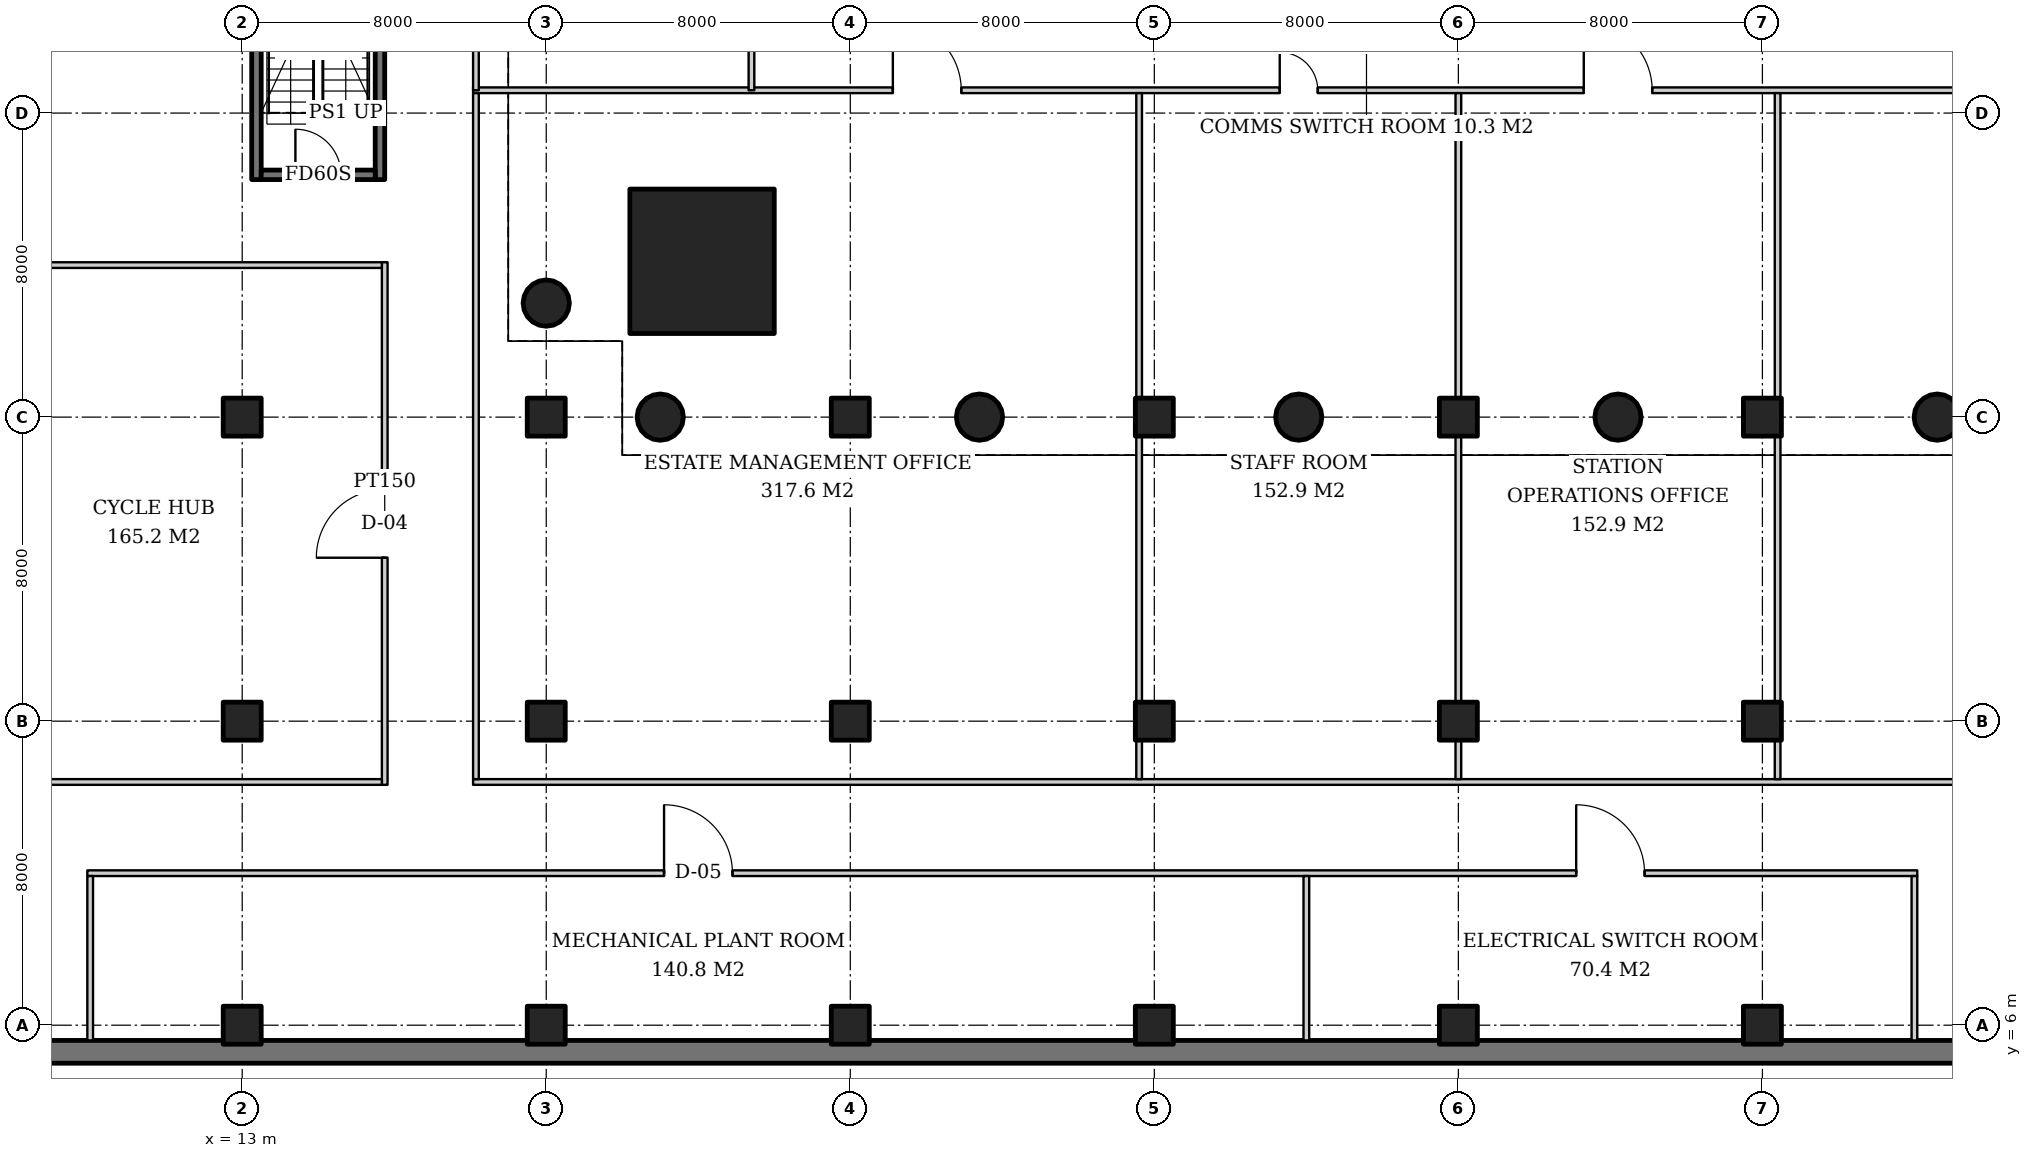
"""IFC4 building model, lengths in metres.
Left out: names, types, materials, properties, quantities, classifications, styles, units other than length and angle.
Written with IfcOpenShell. Run it as: python <this file> out.ifc"""

import sys

from ifc_helpers import new_model, si_unit, direction, frame, frame_2d, origin, origin_2d, place, context, subcontext, project, spatial, rectangle, hollow_circle, extrude, element, fill, save


model = new_model("IFC4")
c1 = context("Model", 3, precision=1e-05, world=origin(), true_north=direction((0.0, 1.0)))
c2 = subcontext(c1, "Body", "Model", "MODEL_VIEW")
j1 = project(units=[si_unit("LENGTHUNIT", "METRE"), si_unit("PLANEANGLEUNIT", "RADIAN")], contexts=[c1])
p1 = place(None, origin())
s1 = spatial("IfcSite", under=j1, at=p1, CompositionType="ELEMENT")
p2 = place(p1, origin())
s2 = spatial("IfcBuilding", under=s1, at=p2, CompositionType="ELEMENT")
p3 = place(p2, frame((0.0, 0.0, -5.0)))
s3 = spatial("IfcBuildingStorey", under=s2, at=p3, CompositionType="ELEMENT", Elevation=-5.0)
for number, where, z_axis, x_axis in (
    (1, (13.0, 6.0, 0.0), (0.0, 0.0, 1.0), (1.0, 0.0, 0.0)),
    (2, (13.0, 14.0, 0.0), (0.0, 0.0, 1.0), (1.0, 0.0, 0.0)),
    (3, (13.0, 22.0, 0.0), (0.0, 0.0, 1.0), (1.0, 0.0, 0.0)),
    (4, (21.0, 6.0, 0.0), (0.0, 0.0, 1.0), (1.0, 0.0, 0.0)),
    (5, (21.0, 14.0, 0.0), (0.0, 0.0, 1.0), (1.0, 0.0, 0.0)),
    (6, (29.0, 6.0, 0.0), (0.0, 0.0, 1.0), (1.0, 0.0, 0.0)),
    (7, (29.0, 14.0, 0.0), (0.0, 0.0, 1.0), (1.0, 0.0, 0.0)),
    (8, (37.0, 6.0, 0.0), (0.0, 0.0, 1.0), (1.0, 0.0, 0.0)),
    (9, (37.0, 14.0, 0.0), (0.0, 0.0, 1.0), (1.0, 0.0, 0.0)),
    (10, (45.0, 6.0, 0.0), (0.0, 0.0, 1.0), (1.0, 0.0, 0.0)),
    (11, (45.0, 14.0, 0.0), (0.0, 0.0, 1.0), (1.0, 0.0, 0.0)),
    (12, (53.0, 6.0, 0.0), (0.0, 0.0, 1.0), (1.0, 0.0, 0.0)),
    (13, (53.0, 14.0, 0.0), (0.0, 0.0, 1.0), (1.0, 0.0, 0.0)),
):
    element("IfcColumn", number, at=place(p3, frame(where, z_axis=z_axis, x_axis=x_axis)), inside=s3, PredefinedType="COLUMN", context=c2, shape_type="SweptSolid", body=[
        extrude(rectangle(XDim=1.0, YDim=1.0, at=origin_2d()), origin(), (0.0, 0.0, 1.0), 5.0),
    ])
p4 = place(p3, frame((4.0, 5.3, 0.0), z_axis=(0.0, 0.0, 1.0), x_axis=(1.0, 0.0, 0.0)))
e14 = element("IfcWall", 14, at=p4, inside=s3, PredefinedType="USERDEFINED", context=c2, shape_type="SweptSolid", body=[
    extrude(rectangle(XDim=80.975, YDim=0.6, at=frame_2d((40.488, 0.0))), origin(), (0.0, 0.0, 1.0), 5.0),
])
p5 = place(p3, frame((25.1, 26.1, 0.0), z_axis=(0.0, 0.0, 1.0), x_axis=(1.0, 0.0, 0.0)))
e15 = element("IfcColumn", 15, at=p5, inside=s3, PredefinedType="COLUMN", context=c2, shape_type="SweptSolid", body=[
    extrude(rectangle(XDim=3.8, YDim=3.8, at=origin_2d()), origin(), (0.0, 0.0, 1.0), 5.0),
])
for number, where, z_axis, x_axis in (
    (16, (21.0, 25.0, 0.0), (0.0, 0.0, 1.0), (1.0, 0.0, 0.0)),
    (17, (24.0, 22.0, 0.0), (0.0, 0.0, 1.0), (1.0, 0.0, 0.0)),
    (18, (32.4, 22.0, 0.0), (0.0, 0.0, 1.0), (1.0, 0.0, 0.0)),
    (19, (40.8, 22.0, 0.0), (0.0, 0.0, 1.0), (1.0, 0.0, 0.0)),
    (20, (49.2, 22.0, 0.0), (0.0, 0.0, 1.0), (1.0, 0.0, 0.0)),
    (21, (57.6, 22.0, 0.0), (0.0, 0.0, 1.0), (1.0, 0.0, 0.0)),
):
    element("IfcColumn", number, at=place(p3, frame(where, z_axis=z_axis, x_axis=x_axis)), inside=s3, PredefinedType="COLUMN", context=c2, shape_type="SweptSolid", body=[
        extrude(hollow_circle(Radius=0.61, WallThickness=0.04, at=origin_2d()), origin(), (0.0, 0.0, 1.0), 5.0),
    ])
for number, where, z_axis, x_axis in (
    (22, (21.0, 22.0, 0.0), (0.0, 0.0, 1.0), (1.0, 0.0, 0.0)),
    (23, (29.0, 22.0, 0.0), (0.0, 0.0, 1.0), (1.0, 0.0, 0.0)),
    (24, (37.0, 22.0, 0.0), (0.0, 0.0, 1.0), (1.0, 0.0, 0.0)),
    (25, (45.0, 22.0, 0.0), (0.0, 0.0, 1.0), (1.0, 0.0, 0.0)),
    (26, (53.0, 22.0, 0.0), (0.0, 0.0, 1.0), (1.0, 0.0, 0.0)),
):
    element("IfcColumn", number, at=place(p3, frame(where, z_axis=z_axis, x_axis=x_axis)), inside=s3, PredefinedType="COLUMN", context=c2, shape_type="SweptSolid", body=[
        extrude(rectangle(XDim=1.0, YDim=1.0, at=origin_2d()), origin(), (0.0, 0.0, 1.0), 5.0),
    ])
for number, where, z_axis, x_axis in (
    (27, (13.375, 28.25, 0.0), (0.0, 0.0, 1.0), (0.0, 1.0, 0.0)),
    (28, (16.625, 28.25, 0.0), (0.0, 0.0, 1.0), (0.0, 1.0, 0.0)),
):
    element("IfcWall", number, at=place(p3, frame(where, z_axis=z_axis, x_axis=x_axis)), inside=s3, PredefinedType="SOLIDWALL", context=c2, shape_type="SweptSolid", body=[
        extrude(rectangle(XDim=8.5, YDim=0.25, at=frame_2d((4.25, 0.0))), origin(), (0.0, 0.0, 1.0), 4.6),
    ])
p6 = place(p3, frame((13.5, 28.375, 0.0), z_axis=(0.0, 0.0, 1.0), x_axis=(1.0, 0.0, 0.0)))
e29 = element("IfcWall", 29, at=p6, inside=s3, PredefinedType="SOLIDWALL", context=c2, shape_type="SweptSolid", body=[
    extrude(rectangle(XDim=3.0, YDim=0.25, at=frame_2d((1.5, 0.0))), origin(), (0.0, 0.0, 1.0), 4.6),
])
p7 = place(p6, frame((0.9, 0.0, 0.0)))
e30 = element("IfcOpeningElement", 30, at=p7, cuts=e29, PredefinedType="OPENING", context=c2, shape_type="SweptSolid", body=[
    extrude(rectangle(XDim=1.2, YDim=2.1, at=frame_2d((0.6, 1.05))), frame((0.0, 0.135, 0.0), z_axis=(0.0, -1.0, 0.0), x_axis=(1.0, 0.0, 0.0)), (0.0, 0.0, 1.0), 0.27),
])
p8 = place(p3, frame((8.925, 10.0, 0.0), z_axis=(0.0, 0.0, 1.0), x_axis=(1.0, 0.0, 0.0)))
e31 = element("IfcWall", 31, at=p8, inside=s3, PredefinedType="PARTITIONING", context=c2, shape_type="SweptSolid", body=[
    extrude(rectangle(XDim=48.15, YDim=0.15, at=frame_2d((24.075, 0.0))), origin(), (0.0, 0.0, 1.0), 4.6),
])
p9 = place(p8, frame((15.175, 0.0, 0.0)))
e32 = element("IfcOpeningElement", 32, at=p9, cuts=e31, PredefinedType="OPENING", context=c2, shape_type="SweptSolid", body=[
    extrude(rectangle(XDim=1.8, YDim=2.4, at=frame_2d((0.9, 1.2))), frame((0.0, 0.085, 0.0), z_axis=(0.0, -1.0, 0.0), x_axis=(1.0, 0.0, 0.0)), (0.0, 0.0, 1.0), 0.17),
])
p10 = place(p8, frame((39.175, 0.0, 0.0)))
e33 = element("IfcOpeningElement", 33, at=p10, cuts=e31, PredefinedType="OPENING", context=c2, shape_type="SweptSolid", body=[
    extrude(rectangle(XDim=1.8, YDim=2.4, at=frame_2d((0.9, 1.2))), frame((0.0, 0.085, 0.0), z_axis=(0.0, -1.0, 0.0), x_axis=(1.0, 0.0, 0.0)), (0.0, 0.0, 1.0), 0.17),
])
for number, where, z_axis, x_axis in (
    (34, (9.0, 9.925, 0.0), (0.0, 0.0, 1.0), (0.0, -1.0, 0.0)),
    (35, (41.0, 9.925, 0.0), (0.0, 0.0, 1.0), (0.0, -1.0, 0.0)),
    (36, (57.0, 9.925, 0.0), (0.0, 0.0, 1.0), (0.0, -1.0, 0.0)),
):
    element("IfcWall", number, at=place(p3, frame(where, z_axis=z_axis, x_axis=x_axis)), inside=s3, PredefinedType="PARTITIONING", context=c2, shape_type="SweptSolid", body=[
        extrude(rectangle(XDim=4.325, YDim=0.15, at=frame_2d((2.163, 0.0))), origin(), (0.0, 0.0, 1.0), 4.6),
    ])
p11 = place(p3, frame((16.75, 12.325, 0.0), z_axis=(0.0, 0.0, 1.0), x_axis=(0.0, 1.0, 0.0)))
e37 = element("IfcWall", 37, at=p11, inside=s3, PredefinedType="PARTITIONING", context=c2, shape_type="SweptSolid", body=[
    extrude(rectangle(XDim=13.75, YDim=0.15, at=frame_2d((6.875, 0.0))), origin(), (0.0, 0.0, 1.0), 4.6),
])
p12 = place(p11, frame((5.975, 0.0, 0.0)))
e38 = element("IfcOpeningElement", 38, at=p12, cuts=e37, PredefinedType="OPENING", context=c2, shape_type="SweptSolid", body=[
    extrude(rectangle(XDim=1.8, YDim=2.4, at=frame_2d((0.9, 1.2))), frame((0.0, 0.085, 0.0), z_axis=(0.0, -1.0, 0.0), x_axis=(1.0, 0.0, 0.0)), (0.0, 0.0, 1.0), 0.17),
])
for number, where, z_axis, x_axis in (
    (39, (4.6, 12.4, 0.0), (0.0, 0.0, 1.0), (1.0, 0.0, 0.0)),
    (40, (4.6, 26.0, 0.0), (0.0, 0.0, 1.0), (1.0, 0.0, 0.0)),
):
    element("IfcWall", number, at=place(p3, frame(where, z_axis=z_axis, x_axis=x_axis)), inside=s3, PredefinedType="PARTITIONING", context=c2, shape_type="SweptSolid", body=[
        extrude(rectangle(XDim=12.075, YDim=0.15, at=frame_2d((6.038, 0.0))), origin(), (0.0, 0.0, 1.0), 4.6),
    ])
p13 = place(p3, frame((19.075, 12.4, 0.0), z_axis=(0.0, 0.0, 1.0), x_axis=(1.0, 0.0, 0.0)))
e41 = element("IfcWall", 41, at=p13, inside=s3, PredefinedType="PARTITIONING", context=c2, shape_type="SweptSolid", body=[
    extrude(rectangle(XDim=52.5, YDim=0.15, at=frame_2d((26.25, 0.0))), origin(), (0.0, 0.0, 1.0), 4.6),
])
p14 = place(p3, frame((19.075, 30.6, 0.0), z_axis=(0.0, 0.0, 1.0), x_axis=(1.0, 0.0, 0.0)))
e42 = element("IfcWall", 42, at=p14, inside=s3, PredefinedType="PARTITIONING", context=c2, shape_type="SweptSolid", body=[
    extrude(rectangle(XDim=52.5, YDim=0.15, at=frame_2d((26.25, 0.0))), origin(), (0.0, 0.0, 1.0), 3.688),
])
p15 = place(p14, frame((11.045, 0.0, 0.0)))
e43 = element("IfcOpeningElement", 43, at=p15, cuts=e42, PredefinedType="OPENING", context=c2, shape_type="SweptSolid", body=[
    extrude(rectangle(XDim=1.8, YDim=2.4, at=frame_2d((0.9, 1.2))), frame((0.0, 0.085, 0.0), z_axis=(0.0, -1.0, 0.0), x_axis=(1.0, 0.0, 0.0)), (0.0, 0.0, 1.0), 0.17),
])
p16 = place(p14, frame((21.225, 0.0, 0.0)))
e44 = element("IfcOpeningElement", 44, at=p16, cuts=e42, PredefinedType="OPENING", context=c2, shape_type="SweptSolid", body=[
    extrude(rectangle(XDim=1.0, YDim=2.1, at=frame_2d((0.5, 1.05))), frame((0.0, 0.085, 0.0), z_axis=(0.0, -1.0, 0.0), x_axis=(1.0, 0.0, 0.0)), (0.0, 0.0, 1.0), 0.17),
])
p17 = place(p14, frame((29.225, 0.0, 0.0)))
e45 = element("IfcOpeningElement", 45, at=p17, cuts=e42, PredefinedType="OPENING", context=c2, shape_type="SweptSolid", body=[
    extrude(rectangle(XDim=1.8, YDim=2.4, at=frame_2d((0.9, 1.2))), frame((0.0, 0.085, 0.0), z_axis=(0.0, -1.0, 0.0), x_axis=(1.0, 0.0, 0.0)), (0.0, 0.0, 1.0), 0.17),
])
p18 = place(p14, frame((39.005, 0.0, 0.0)))
e46 = element("IfcOpeningElement", 46, at=p18, cuts=e42, PredefinedType="OPENING", context=c2, shape_type="SweptSolid", body=[
    extrude(rectangle(XDim=1.8, YDim=2.4, at=frame_2d((0.9, 1.2))), frame((0.0, 0.085, 0.0), z_axis=(0.0, -1.0, 0.0), x_axis=(1.0, 0.0, 0.0)), (0.0, 0.0, 1.0), 0.17),
])
p19 = place(p3, frame((19.15, 12.475, 0.0), z_axis=(0.0, 0.0, 1.0), x_axis=(0.0, 1.0, 0.0)))
e47 = element("IfcWall", 47, at=p19, inside=s3, PredefinedType="PARTITIONING", context=c2, shape_type="SweptSolid", body=[
    extrude(rectangle(XDim=18.05, YDim=0.15, at=frame_2d((9.025, 0.0))), origin(), (0.0, 0.0, 1.0), 4.6),
])
p20 = place(p3, frame((36.6, 12.475, 0.0), z_axis=(0.0, 0.0, 1.0), x_axis=(0.0, 1.0, 0.0)))
e48 = element("IfcWall", 48, at=p20, inside=s3, PredefinedType="PARTITIONING", context=c2, shape_type="SweptSolid", body=[
    extrude(rectangle(XDim=1.025, YDim=0.15, at=frame_2d((0.512, 0.0))), origin(), (0.0, 0.0, 1.0), 4.6),
])
p21 = place(p3, frame((36.6, 14.5, 0.0), z_axis=(0.0, 0.0, 1.0), x_axis=(0.0, 1.0, 0.0)))
e49 = element("IfcWall", 49, at=p21, inside=s3, PredefinedType="PARTITIONING", context=c2, shape_type="SweptSolid", body=[
    extrude(rectangle(XDim=7.0, YDim=0.15, at=frame_2d((3.5, 0.0))), origin(), (0.0, 0.0, 1.0), 4.6),
])
p22 = place(p3, frame((36.6, 22.5, 0.0), z_axis=(0.0, 0.0, 1.0), x_axis=(0.0, 1.0, 0.0)))
e50 = element("IfcWall", 50, at=p22, inside=s3, PredefinedType="PARTITIONING", context=c2, shape_type="SweptSolid", body=[
    extrude(rectangle(XDim=8.025, YDim=0.15, at=frame_2d((4.012, 0.0))), origin(), (0.0, 0.0, 1.0), 4.7),
])
p23 = place(p3, frame((45.0, 12.475, 0.0), z_axis=(0.0, 0.0, 1.0), x_axis=(0.0, 1.0, 0.0)))
e51 = element("IfcWall", 51, at=p23, inside=s3, PredefinedType="PARTITIONING", context=c2, shape_type="SweptSolid", body=[
    extrude(rectangle(XDim=1.025, YDim=0.15, at=frame_2d((0.512, 0.0))), origin(), (0.0, 0.0, 1.0), 4.6),
])
p24 = place(p3, frame((45.0, 14.5, 0.0), z_axis=(0.0, 0.0, 1.0), x_axis=(0.0, 1.0, 0.0)))
e52 = element("IfcWall", 52, at=p24, inside=s3, PredefinedType="PARTITIONING", context=c2, shape_type="SweptSolid", body=[
    extrude(rectangle(XDim=7.0, YDim=0.15, at=frame_2d((3.5, 0.0))), origin(), (0.0, 0.0, 1.0), 4.6),
])
p25 = place(p3, frame((45.0, 22.5, 0.0), z_axis=(0.0, 0.0, 1.0), x_axis=(0.0, 1.0, 0.0)))
e53 = element("IfcWall", 53, at=p25, inside=s3, PredefinedType="PARTITIONING", context=c2, shape_type="SweptSolid", body=[
    extrude(rectangle(XDim=8.025, YDim=0.15, at=frame_2d((4.012, 0.0))), origin(), (0.0, 0.0, 1.0), 4.7),
])
p26 = place(p3, frame((53.4, 12.475, 0.0), z_axis=(0.0, 0.0, 1.0), x_axis=(0.0, 1.0, 0.0)))
e54 = element("IfcWall", 54, at=p26, inside=s3, PredefinedType="PARTITIONING", context=c2, shape_type="SweptSolid", body=[
    extrude(rectangle(XDim=1.025, YDim=0.15, at=frame_2d((0.512, 0.0))), origin(), (0.0, 0.0, 1.0), 4.6),
])
p27 = place(p3, frame((53.4, 14.5, 0.0), z_axis=(0.0, 0.0, 1.0), x_axis=(0.0, 1.0, 0.0)))
e55 = element("IfcWall", 55, at=p27, inside=s3, PredefinedType="PARTITIONING", context=c2, shape_type="SweptSolid", body=[
    extrude(rectangle(XDim=7.0, YDim=0.15, at=frame_2d((3.5, 0.0))), origin(), (0.0, 0.0, 1.0), 4.6),
])
p28 = place(p3, frame((53.4, 22.5, 0.0), z_axis=(0.0, 0.0, 1.0), x_axis=(0.0, 1.0, 0.0)))
e56 = element("IfcWall", 56, at=p28, inside=s3, PredefinedType="PARTITIONING", context=c2, shape_type="SweptSolid", body=[
    extrude(rectangle(XDim=8.025, YDim=0.15, at=frame_2d((4.012, 0.0))), origin(), (0.0, 0.0, 1.0), 4.7),
])
p29 = place(p3, frame((19.15, 30.6, 0.0), z_axis=(0.0, 0.0, 1.0), x_axis=(0.0, 1.0, 0.0)))
e57 = element("IfcWall", 57, at=p29, inside=s3, PredefinedType="PARTITIONING", context=c2, shape_type="SweptSolid", body=[
    extrude(rectangle(XDim=30.875, YDim=0.15, at=frame_2d((15.438, 0.0))), origin(), (0.0, 0.0, 1.0), 4.6),
])
p30 = place(p3, frame((26.4, 30.6, 0.0), z_axis=(0.0, 0.0, 1.0), x_axis=(0.0, 1.0, 0.0)))
e58 = element("IfcWall", 58, at=p30, inside=s3, PredefinedType="PARTITIONING", context=c2, shape_type="SweptSolid", body=[
    extrude(rectangle(XDim=30.875, YDim=0.15, at=frame_2d((15.438, 0.0))), origin(), (0.0, 0.0, 1.0), 3.688),
])
p31 = place(p30, frame((6.8, 0.0, 0.0)))
e59 = element("IfcOpeningElement", 59, at=p31, cuts=e58, PredefinedType="OPENING", context=c2, shape_type="SweptSolid", body=[
    extrude(rectangle(XDim=1.8, YDim=2.4, at=frame_2d((0.9, 1.2))), frame((0.0, 0.085, 0.0), z_axis=(0.0, -1.0, 0.0), x_axis=(1.0, 0.0, 0.0)), (0.0, 0.0, 1.0), 0.17),
])
p32 = place(p30, frame((22.2, 0.0, 0.0)))
e60 = element("IfcOpeningElement", 60, at=p32, cuts=e58, PredefinedType="OPENING", context=c2, shape_type="SweptSolid", body=[
    extrude(rectangle(XDim=1.8, YDim=2.4, at=frame_2d((0.9, 1.2))), frame((0.0, 0.085, 0.0), z_axis=(0.0, -1.0, 0.0), x_axis=(1.0, 0.0, 0.0)), (0.0, 0.0, 1.0), 0.17),
])
p33 = place(p7, origin())
e61 = element("IfcDoor", 61, at=p33, inside=s3, OperationType="SINGLE_SWING_LEFT", PredefinedType="DOOR", context=c2, shape_type="SweptSolid", body=[
    extrude(rectangle(XDim=1.2, YDim=2.1, at=frame_2d((0.6, 1.05))), frame((0.0, 0.025, 0.0), z_axis=(0.0, -1.0, 0.0), x_axis=(1.0, 0.0, 0.0)), (0.0, 0.0, 1.0), 0.05),
])
fill(e30, e61)
p34 = place(p9, origin())
e62 = element("IfcDoor", 62, at=p34, inside=s3, OperationType="DOUBLE_DOOR_SINGLE_SWING", PredefinedType="DOOR", context=c2, shape_type="SweptSolid", body=[
    extrude(rectangle(XDim=1.8, YDim=2.4, at=frame_2d((0.9, 1.2))), frame((0.0, 0.025, 0.0), z_axis=(0.0, -1.0, 0.0), x_axis=(1.0, 0.0, 0.0)), (0.0, 0.0, 1.0), 0.05),
])
fill(e32, e62)
p35 = place(p10, origin())
e63 = element("IfcDoor", 63, at=p35, inside=s3, OperationType="DOUBLE_DOOR_SINGLE_SWING", PredefinedType="DOOR", context=c2, shape_type="SweptSolid", body=[
    extrude(rectangle(XDim=1.8, YDim=2.4, at=frame_2d((0.9, 1.2))), frame((0.0, 0.025, 0.0), z_axis=(0.0, -1.0, 0.0), x_axis=(1.0, 0.0, 0.0)), (0.0, 0.0, 1.0), 0.05),
])
fill(e33, e63)
p36 = place(p12, origin())
e64 = element("IfcDoor", 64, at=p36, inside=s3, OperationType="DOUBLE_DOOR_SINGLE_SWING", PredefinedType="DOOR", context=c2, shape_type="SweptSolid", body=[
    extrude(rectangle(XDim=1.8, YDim=2.4, at=frame_2d((0.9, 1.2))), frame((0.0, 0.025, 0.0), z_axis=(0.0, -1.0, 0.0), x_axis=(1.0, 0.0, 0.0)), (0.0, 0.0, 1.0), 0.05),
])
fill(e38, e64)
p37 = place(p15, origin())
e65 = element("IfcDoor", 65, at=p37, inside=s3, OperationType="DOUBLE_DOOR_SINGLE_SWING", PredefinedType="DOOR", context=c2, shape_type="SweptSolid", body=[
    extrude(rectangle(XDim=1.8, YDim=2.4, at=frame_2d((0.9, 1.2))), frame((0.0, 0.025, 0.0), z_axis=(0.0, -1.0, 0.0), x_axis=(1.0, 0.0, 0.0)), (0.0, 0.0, 1.0), 0.05),
])
fill(e43, e65)
p38 = place(p16, origin())
e66 = element("IfcDoor", 66, at=p38, inside=s3, OperationType="SINGLE_SWING_LEFT", PredefinedType="DOOR", context=c2, shape_type="SweptSolid", body=[
    extrude(rectangle(XDim=1.0, YDim=2.1, at=frame_2d((0.5, 1.05))), frame((0.0, 0.025, 0.0), z_axis=(0.0, -1.0, 0.0), x_axis=(1.0, 0.0, 0.0)), (0.0, 0.0, 1.0), 0.05),
])
fill(e44, e66)
p39 = place(p17, origin())
e67 = element("IfcDoor", 67, at=p39, inside=s3, OperationType="DOUBLE_DOOR_SINGLE_SWING", PredefinedType="DOOR", context=c2, shape_type="SweptSolid", body=[
    extrude(rectangle(XDim=1.8, YDim=2.4, at=frame_2d((0.9, 1.2))), frame((0.0, 0.025, 0.0), z_axis=(0.0, -1.0, 0.0), x_axis=(1.0, 0.0, 0.0)), (0.0, 0.0, 1.0), 0.05),
])
fill(e45, e67)
save(model, sys.argv[1])
